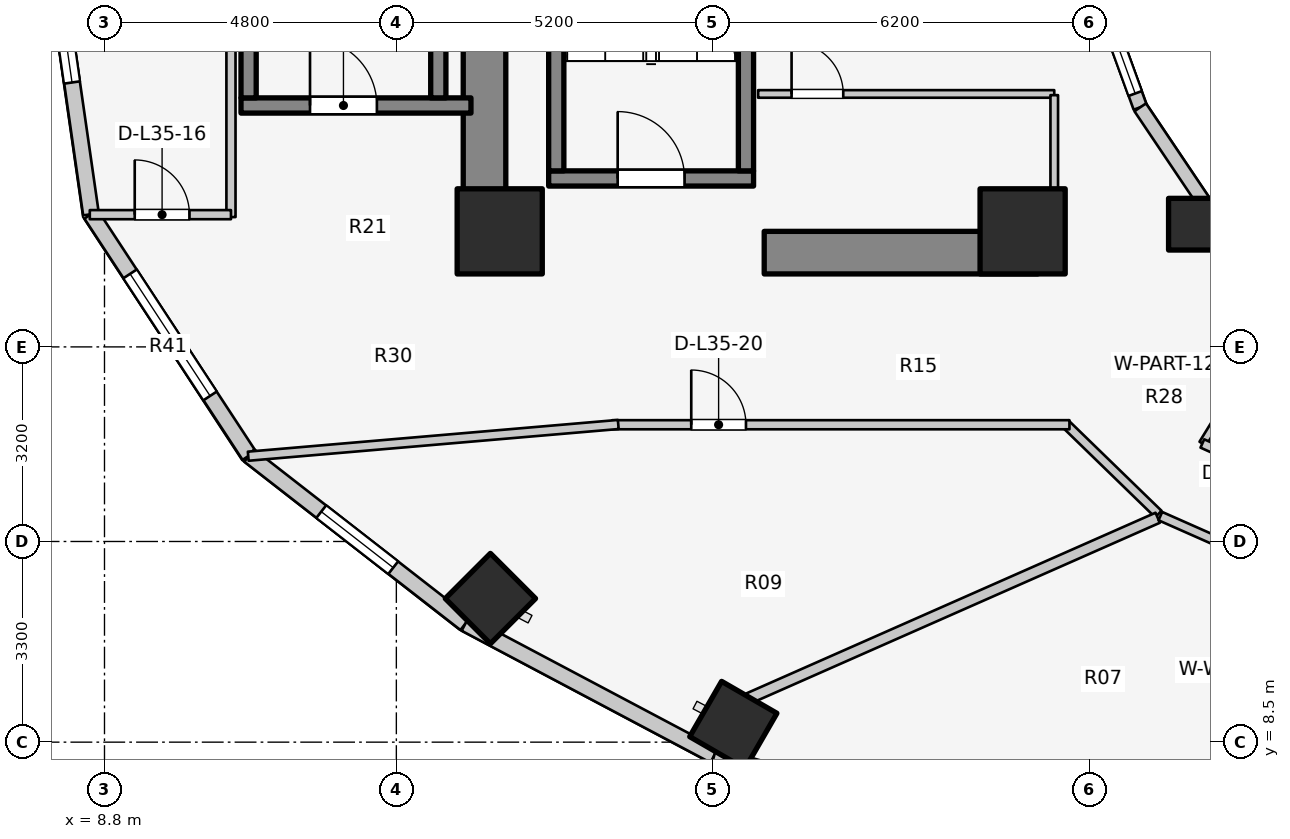
"""IFC4 building model, lengths in metres.
Left out: names, types, materials, properties, quantities, classifications, styles, units other than length and angle.
Written with IfcOpenShell. Run it as: python <this file> out.ifc"""

import sys

from ifc_helpers import new_model, si_unit, direction, frame, frame_2d, origin, origin_2d, place, context, subcontext, project, spatial, rectangle, extrude, element, fill, save


model = new_model("IFC4")
c1 = context("Model", 3, precision=1e-05, world=origin(), true_north=direction((0.0, 1.0)))
c2 = subcontext(c1, "Body", "Model", "MODEL_VIEW")
j1 = project(units=[si_unit("LENGTHUNIT", "METRE"), si_unit("PLANEANGLEUNIT", "RADIAN")], contexts=[c1])
p1 = place(None, origin())
s1 = spatial("IfcSite", under=j1, at=p1, CompositionType="ELEMENT")
p2 = place(p1, origin())
s2 = spatial("IfcBuilding", under=s1, at=p2, CompositionType="ELEMENT")
p3 = place(p2, frame((0.0, 0.0, 116.6)))
s3 = spatial("IfcBuildingStorey", under=s2, at=p3, CompositionType="ELEMENT", Elevation=116.6)
p4 = place(p3, frame((15.05, 17.05, 0.0), z_axis=(0.0, 0.0, 1.0), x_axis=(0.0, 1.0, 0.0)))
e1 = element("IfcWall", 1, at=p4, inside=s3, PredefinedType="SHEAR", context=c2, shape_type="SweptSolid", body=[
    extrude(rectangle(XDim=12.8, YDim=0.7, at=frame_2d((6.4, 0.0))), origin(), (0.0, 0.0, 1.0), 3.1),
])
p5 = place(p3, frame((19.65, 16.55, 0.0), z_axis=(0.0, 0.0, 1.0), x_axis=(1.0, 0.0, 0.0)))
e2 = element("IfcWall", 2, at=p5, inside=s3, PredefinedType="SHEAR", context=c2, shape_type="SweptSolid", body=[
    extrude(rectangle(XDim=4.5, YDim=0.7, at=frame_2d((2.25, 0.0))), origin(), (0.0, 0.0, 1.0), 3.1),
])
p6 = place(p3, frame((16.105, 17.77, 0.0), z_axis=(0.0, 0.0, 1.0), x_axis=(1.0, 0.0, 0.0)))
e3 = element("IfcWall", 3, at=p6, inside=s3, PredefinedType="SOLIDWALL", context=c2, shape_type="SweptSolid", body=[
    extrude(rectangle(XDim=3.37, YDim=0.25, at=frame_2d((1.685, 0.0))), origin(), (0.0, 0.0, 1.0), 3.1),
])
p7 = place(p6, frame((1.135, 0.0, 0.0)))
e4 = element("IfcOpeningElement", 4, at=p7, cuts=e3, PredefinedType="OPENING", context=c2, shape_type="SweptSolid", body=[
    extrude(rectangle(XDim=1.1, YDim=2.1, at=frame_2d((0.55, 1.05))), frame((0.0, 0.135, 0.0), z_axis=(0.0, -1.0, 0.0), x_axis=(1.0, 0.0, 0.0)), (0.0, 0.0, 1.0), 0.27),
])
for number, where, z_axis, x_axis in (
    (5, (16.23, 17.895, 0.0), (0.0, 0.0, 1.0), (0.0, 1.0, 0.0)),
    (6, (19.35, 17.895, 0.0), (0.0, 0.0, 1.0), (0.0, 1.0, 0.0)),
):
    element("IfcWall", number, at=place(p3, frame(where, z_axis=z_axis, x_axis=x_axis)), inside=s3, PredefinedType="SOLIDWALL", context=c2, shape_type="SweptSolid", body=[
        extrude(rectangle(XDim=7.81, YDim=0.25, at=frame_2d((3.905, 0.0))), origin(), (0.0, 0.0, 1.0), 3.1),
    ])
p8 = place(p3, frame((11.045, 18.97, 0.0), z_axis=(0.0, 0.0, 1.0), x_axis=(1.0, 0.0, 0.0)))
e7 = element("IfcWall", 7, at=p8, inside=s3, PredefinedType="SOLIDWALL", context=c2, shape_type="SweptSolid", body=[
    extrude(rectangle(XDim=3.782, YDim=0.25, at=frame_2d((1.891, 0.0))), origin(), (0.0, 0.0, 1.0), 3.1),
])
p9 = place(p8, frame((1.135, 0.0, 0.0)))
e8 = element("IfcOpeningElement", 8, at=p9, cuts=e7, PredefinedType="OPENING", context=c2, shape_type="SweptSolid", body=[
    extrude(rectangle(XDim=1.1, YDim=2.1, at=frame_2d((0.55, 1.05))), frame((0.0, 0.135, 0.0), z_axis=(0.0, -1.0, 0.0), x_axis=(1.0, 0.0, 0.0)), (0.0, 0.0, 1.0), 0.27),
])
for number, where, z_axis, x_axis in (
    (9, (11.17, 19.095, 0.0), (0.0, 0.0, 1.0), (0.0, 1.0, 0.0)),
    (10, (14.29, 19.095, 0.0), (0.0, 0.0, 1.0), (0.0, 1.0, 0.0)),
):
    element("IfcWall", number, at=place(p3, frame(where, z_axis=z_axis, x_axis=x_axis)), inside=s3, PredefinedType="SOLIDWALL", context=c2, shape_type="SweptSolid", body=[
        extrude(rectangle(XDim=7.81, YDim=0.25, at=frame_2d((3.905, 0.0))), origin(), (0.0, 0.0, 1.0), 3.1),
    ])
for number, where, z_axis, x_axis in (
    (11, (15.3, 16.9, 0.0), (0.0, 0.0, 1.0), (1.0, 0.0, 0.0)),
    (12, (23.9, 16.9, 0.0), (0.0, 0.0, 1.0), (1.0, 0.0, 0.0)),
):
    element("IfcColumn", number, at=place(p3, frame(where, z_axis=z_axis, x_axis=x_axis)), inside=s3, PredefinedType="COLUMN", context=c2, shape_type="SweptSolid", body=[
        extrude(rectangle(XDim=1.4, YDim=1.4, at=origin_2d()), origin(), (0.0, 0.0, 1.0), 3.1),
    ])
p10 = place(p3, frame((26.725, 17.018, 0.0), z_axis=(0.0, 0.0, 1.0), x_axis=(1.0, 0.0, 0.0)))
e13 = element("IfcColumn", 13, at=p10, inside=s3, PredefinedType="COLUMN", context=c2, shape_type="SweptSolid", body=[
    extrude(rectangle(XDim=0.85, YDim=0.85, at=origin_2d()), origin(), (0.0, 0.0, 1.0), 3.1),
])
for number, where, z_axis, x_axis in (
    (14, (15.147, 10.862, 0.0), (0.0, 0.0, 1.0), (-0.707, -0.707, 0.0)),
    (15, (19.142, 8.782, 0.0), (0.0, 0.0, 1.0), (-0.5, -0.866, 0.0)),
):
    element("IfcColumn", number, at=place(p3, frame(where, z_axis=z_axis, x_axis=x_axis)), inside=s3, PredefinedType="COLUMN", context=c2, shape_type="SweptSolid", body=[
        extrude(rectangle(XDim=1.05, YDim=1.05, at=origin_2d()), origin(), (0.0, 0.0, 1.0), 3.1),
    ])
p11 = place(p3, frame((25.123, 20.898, 0.0), z_axis=(0.0, 0.0, 1.0), x_axis=(0.341423187295, -0.93990968033, 0.0)))
e16 = element("IfcWall", 16, at=p11, inside=s3, PredefinedType="STANDARD", context=c2, shape_type="SweptSolid", body=[
    extrude(rectangle(XDim=2.084, YDim=0.23, at=frame_2d((1.042, 0.0))), origin(), (0.0, 0.0, 1.0), 2.84),
])
p12 = place(p11, frame((0.242, 0.0, 0.85)))
e17 = element("IfcOpeningElement", 17, at=p12, cuts=e16, PredefinedType="OPENING", context=c2, shape_type="SweptSolid", body=[
    extrude(rectangle(XDim=1.6, YDim=1.65, at=frame_2d((0.8, 0.825))), frame((0.0, 0.125, 0.0), z_axis=(0.0, -1.0, 0.0), x_axis=(1.0, 0.0, 0.0)), (0.0, 0.0, 1.0), 0.25),
])
p13 = place(p3, frame((25.834, 18.94, 0.0), z_axis=(0.0, 0.0, 1.0), x_axis=(0.558197800898, -0.829707909492, 0.0)))
e18 = element("IfcWall", 18, at=p13, inside=s3, PredefinedType="STANDARD", context=c2, shape_type="SweptSolid", body=[
    extrude(rectangle(XDim=2.027, YDim=0.23, at=frame_2d((1.013, 0.0))), origin(), (0.0, 0.0, 1.0), 2.16),
])
p14 = place(p3, frame((26.965, 17.258, 0.0), z_axis=(0.0, 0.0, 1.0), x_axis=(0.752576694707, -0.658504607869, 0.0)))
e19 = element("IfcWall", 19, at=p14, inside=s3, PredefinedType="STANDARD", context=c2, shape_type="SweptSolid", body=[
    extrude(rectangle(XDim=1.959, YDim=0.23, at=frame_2d((0.98, 0.0))), origin(), (0.0, 0.0, 1.0), 2.16),
])
p15 = place(p3, frame((7.74, 23.0, 0.0), z_axis=(0.0, 0.0, 1.0), x_axis=(0.142572472068, -0.98978436551, 0.0)))
e20 = element("IfcWall", 20, at=p15, inside=s3, PredefinedType="STANDARD", context=c2, shape_type="SweptSolid", body=[
    extrude(rectangle(XDim=5.879, YDim=0.26, at=frame_2d((2.939, 0.0))), origin(), (0.0, 0.0, 1.0), 2.85),
])
p16 = place(p15, frame((2.189, 0.0, 0.75)))
e21 = element("IfcOpeningElement", 21, at=p16, cuts=e20, PredefinedType="OPENING", context=c2, shape_type="SweptSolid", body=[
    extrude(rectangle(XDim=1.5, YDim=1.6, at=frame_2d((0.75, 0.8))), frame((0.0, 0.14, 0.0), z_axis=(0.0, -1.0, 0.0), x_axis=(1.0, 0.0, 0.0)), (0.0, 0.0, 1.0), 0.28),
])
p17 = place(p3, frame((8.578, 17.181, 0.0), z_axis=(0.0, 0.0, 1.0), x_axis=(0.548283220945, -0.836292717672, 0.0)))
e22 = element("IfcWall", 22, at=p17, inside=s3, PredefinedType="STANDARD", context=c2, shape_type="SweptSolid", body=[
    extrude(rectangle(XDim=4.744, YDim=0.26, at=frame_2d((2.372, 0.0))), origin(), (0.0, 0.0, 1.0), 2.85),
])
p18 = place(p17, frame((1.172, 0.0, 0.75)))
e23 = element("IfcOpeningElement", 23, at=p18, cuts=e22, PredefinedType="OPENING", context=c2, shape_type="SweptSolid", body=[
    extrude(rectangle(XDim=2.4, YDim=1.7, at=frame_2d((1.2, 0.85))), frame((0.0, 0.14, 0.0), z_axis=(0.0, -1.0, 0.0), x_axis=(1.0, 0.0, 0.0)), (0.0, 0.0, 1.0), 0.28),
])
p19 = place(p3, frame((11.179, 13.214, 0.0), z_axis=(0.0, 0.0, 1.0), x_axis=(0.789127449954, -0.614229491094, 0.0)))
e24 = element("IfcWall", 24, at=p19, inside=s3, PredefinedType="STANDARD", context=c2, shape_type="SweptSolid", body=[
    extrude(rectangle(XDim=4.505, YDim=0.26, at=frame_2d((2.252, 0.0))), origin(), (0.0, 0.0, 1.0), 2.85),
])
p20 = place(p19, frame((1.502, 0.0, 0.75)))
e25 = element("IfcOpeningElement", 25, at=p20, cuts=e24, PredefinedType="OPENING", context=c2, shape_type="SweptSolid", body=[
    extrude(rectangle(XDim=1.5, YDim=1.6, at=frame_2d((0.75, 0.8))), frame((0.0, 0.14, 0.0), z_axis=(0.0, -1.0, 0.0), x_axis=(1.0, 0.0, 0.0)), (0.0, 0.0, 1.0), 0.28),
])
p21 = place(p3, frame((14.734, 10.447, 0.0), z_axis=(0.0, 0.0, 1.0), x_axis=(0.883668636807, -0.4681129568, 0.0)))
e26 = element("IfcWall", 26, at=p21, inside=s3, PredefinedType="STANDARD", context=c2, shape_type="SweptSolid", body=[
    extrude(rectangle(XDim=4.631, YDim=0.26, at=frame_2d((2.316, 0.0))), origin(), (0.0, 0.0, 1.0), 2.85),
])
p22 = place(p3, frame((18.827, 8.279, 0.0), z_axis=(0.0, 0.0, 1.0), x_axis=(0.962938491413, -0.269721081407, 0.0)))
e27 = element("IfcWall", 27, at=p22, inside=s3, PredefinedType="STANDARD", context=c2, shape_type="SweptSolid", body=[
    extrude(rectangle(XDim=5.563, YDim=0.26, at=frame_2d((2.782, 0.0))), origin(), (0.0, 0.0, 1.0), 2.85),
])
p23 = place(p22, frame((1.582, 0.0, 0.75)))
e28 = element("IfcOpeningElement", 28, at=p23, cuts=e27, PredefinedType="OPENING", context=c2, shape_type="SweptSolid", body=[
    extrude(rectangle(XDim=2.4, YDim=1.7, at=frame_2d((1.2, 0.85))), frame((0.0, 0.14, 0.0), z_axis=(0.0, -1.0, 0.0), x_axis=(1.0, 0.0, 0.0)), (0.0, 0.0, 1.0), 0.28),
])
p24 = place(p3, frame((19.55, 19.16, 0.0), z_axis=(0.0, 0.0, 1.0), x_axis=(1.0, 0.0, 0.0)))
e29 = element("IfcWall", 29, at=p24, inside=s3, PredefinedType="PARTITIONING", context=c2, shape_type="SweptSolid", body=[
    extrude(rectangle(XDim=4.87, YDim=0.125, at=frame_2d((2.435, 0.0))), origin(), (0.0, 0.0, 1.0), 2.12),
])
p25 = place(p24, frame((0.55, 0.0, 0.0)))
e30 = element("IfcOpeningElement", 30, at=p25, cuts=e29, PredefinedType="OPENING", context=c2, shape_type="SweptSolid", body=[
    extrude(rectangle(XDim=0.85, YDim=2.05, at=frame_2d((0.425, 1.025))), frame((0.0, 0.073, 0.0), z_axis=(0.0, -1.0, 0.0), x_axis=(1.0, 0.0, 0.0)), (0.0, 0.0, 1.0), 0.145),
])
p26 = place(p3, frame((24.42, 17.1, 0.0), z_axis=(0.0, 0.0, 1.0), x_axis=(0.0, 1.0, 0.0)))
e31 = element("IfcWall", 31, at=p26, inside=s3, PredefinedType="PARTITIONING", context=c2, shape_type="SweptSolid", body=[
    extrude(rectangle(XDim=2.04, YDim=0.125, at=frame_2d((1.02, 0.0))), origin(), (0.0, 0.0, 1.0), 2.153),
])
p27 = place(p3, frame((10.88, 17.135, 0.0), z_axis=(0.0, 0.0, 1.0), x_axis=(0.0, 1.0, 0.0)))
e32 = element("IfcWall", 32, at=p27, inside=s3, PredefinedType="PARTITIONING", context=c2, shape_type="SweptSolid", body=[
    extrude(rectangle(XDim=11.73, YDim=0.15, at=frame_2d((5.865, 0.0))), origin(), (0.0, 0.0, 1.0), 2.12),
])
p28 = place(p3, frame((8.558, 17.175, 0.0), z_axis=(0.0, 0.0, 1.0), x_axis=(1.0, 0.0, 0.0)))
e33 = element("IfcWall", 33, at=p28, inside=s3, PredefinedType="PARTITIONING", context=c2, shape_type="SweptSolid", body=[
    extrude(rectangle(XDim=2.322, YDim=0.15, at=frame_2d((1.161, 0.0))), origin(), (0.0, 0.0, 1.0), 2.855),
])
p29 = place(p28, frame((0.739, 0.0, 0.0)))
e34 = element("IfcOpeningElement", 34, at=p29, cuts=e33, PredefinedType="OPENING", context=c2, shape_type="SweptSolid", body=[
    extrude(rectangle(XDim=0.9, YDim=2.1, at=frame_2d((0.45, 1.05))), frame((0.0, 0.085, 0.0), z_axis=(0.0, -1.0, 0.0), x_axis=(1.0, 0.0, 0.0)), (0.0, 0.0, 1.0), 0.17),
])
p30 = place(p3, frame((26.133, 12.251, 0.0), z_axis=(0.0, 0.0, 1.0), x_axis=(-0.717419568599, 0.696641344302, 0.0)))
e35 = element("IfcWall", 35, at=p30, inside=s3, PredefinedType="PARTITIONING", context=c2, shape_type="SweptSolid", body=[
    extrude(rectangle(XDim=2.138, YDim=0.15, at=frame_2d((1.069, 0.0))), origin(), (0.0, 0.0, 1.0), 2.272),
])
p31 = place(p3, frame((17.15, 13.72, 0.0), z_axis=(0.0, 0.0, 1.0), x_axis=(1.0, 0.0, 0.0)))
e36 = element("IfcWall", 36, at=p31, inside=s3, PredefinedType="PARTITIONING", context=c2, shape_type="SweptSolid", body=[
    extrude(rectangle(XDim=7.52, YDim=0.15, at=frame_2d((3.76, 0.0))), origin(), (0.0, 0.0, 1.0), 2.272),
])
p32 = place(p31, frame((1.3, 0.0, 0.0)))
e37 = element("IfcOpeningElement", 37, at=p32, cuts=e36, PredefinedType="OPENING", context=c2, shape_type="SweptSolid", body=[
    extrude(rectangle(XDim=0.9, YDim=2.1, at=frame_2d((0.45, 1.05))), frame((0.0, 0.085, 0.0), z_axis=(0.0, -1.0, 0.0), x_axis=(1.0, 0.0, 0.0)), (0.0, 0.0, 1.0), 0.17),
])
p33 = place(p3, frame((17.25, 13.724, 0.0), z_axis=(0.0, 0.0, 1.0), x_axis=(-0.996341886029, -0.085456691633, 0.0)))
e38 = element("IfcWall", 38, at=p33, inside=s3, PredefinedType="PARTITIONING", context=c2, shape_type="SweptSolid", body=[
    extrude(rectangle(XDim=6.108, YDim=0.15, at=frame_2d((3.054, 0.0))), origin(), (0.0, 0.0, 1.0), 2.142),
])
p34 = place(p3, frame((28.45, 15.985, 0.0), z_axis=(0.0, 0.0, 1.0), x_axis=(-0.524565340045, -0.851370192116, 0.0)))
e39 = element("IfcWall", 39, at=p34, inside=s3, PredefinedType="PARTITIONING", context=c2, shape_type="SweptSolid", body=[
    extrude(rectangle(XDim=3.027, YDim=0.125, at=frame_2d((1.514, 0.0))), origin(), (0.0, 0.0, 1.0), 2.272),
])
p35 = place(p3, frame((26.856, 13.412, 0.0), z_axis=(0.0, 0.0, 1.0), x_axis=(0.912985265053, -0.407992531545, 0.0)))
e40 = element("IfcWall", 40, at=p35, inside=s3, PredefinedType="PARTITIONING", context=c2, shape_type="SweptSolid", body=[
    extrude(rectangle(XDim=2.723, YDim=0.15, at=frame_2d((1.362, 0.0))), origin(), (0.0, 0.0, 1.0), 2.272),
])
p36 = place(p3, frame((26.122, 12.191, 0.0), z_axis=(0.0, 0.0, 1.0), x_axis=(-0.914765930761, -0.403984271872, 0.0)))
e41 = element("IfcWall", 41, at=p36, inside=s3, PredefinedType="PARTITIONING", context=c2, shape_type="SweptSolid", body=[
    extrude(rectangle(XDim=7.354, YDim=0.18, at=frame_2d((3.677, 0.0))), origin(), (0.0, 0.0, 1.0), 2.272),
])
p37 = place(p3, frame((26.165, 12.217, 0.0), z_axis=(0.0, 0.0, 1.0), x_axis=(0.91445214467, -0.404694051239, 0.0)))
e42 = element("IfcWall", 42, at=p37, inside=s3, PredefinedType="PARTITIONING", context=c2, shape_type="SweptSolid", body=[
    extrude(rectangle(XDim=3.091, YDim=0.15, at=frame_2d((1.545, 0.0))), origin(), (0.0, 0.0, 1.0), 2.272),
])
p38 = place(p37, frame((1.045, 0.0, 0.0)))
e43 = element("IfcOpeningElement", 43, at=p38, cuts=e42, PredefinedType="OPENING", context=c2, shape_type="SweptSolid", body=[
    extrude(rectangle(XDim=1.0, YDim=2.1, at=frame_2d((0.5, 1.05))), frame((0.0, 0.085, 0.0), z_axis=(0.0, -1.0, 0.0), x_axis=(1.0, 0.0, 0.0)), (0.0, 0.0, 1.0), 0.17),
])
p39 = place(p12, origin())
e44 = element("IfcWindow", 44, at=p39, inside=s3, PartitioningType="SINGLE_PANEL", PredefinedType="WINDOW", context=c2, shape_type="SweptSolid", body=[
    extrude(rectangle(XDim=1.6, YDim=1.65, at=frame_2d((0.8, 0.825))), frame((0.0, 0.03, 0.0), z_axis=(0.0, -1.0, 0.0), x_axis=(1.0, 0.0, 0.0)), (0.0, 0.0, 1.0), 0.06),
])
fill(e17, e44)
p40 = place(p16, origin())
e45 = element("IfcWindow", 45, at=p40, inside=s3, PartitioningType="SINGLE_PANEL", PredefinedType="WINDOW", context=c2, shape_type="SweptSolid", body=[
    extrude(rectangle(XDim=1.5, YDim=1.6, at=frame_2d((0.75, 0.8))), frame((0.0, 0.03, 0.0), z_axis=(0.0, -1.0, 0.0), x_axis=(1.0, 0.0, 0.0)), (0.0, 0.0, 1.0), 0.06),
])
fill(e21, e45)
p41 = place(p18, origin())
e46 = element("IfcWindow", 46, at=p41, inside=s3, PartitioningType="SINGLE_PANEL", PredefinedType="WINDOW", context=c2, shape_type="SweptSolid", body=[
    extrude(rectangle(XDim=2.4, YDim=1.7, at=frame_2d((1.2, 0.85))), frame((0.0, 0.03, 0.0), z_axis=(0.0, -1.0, 0.0), x_axis=(1.0, 0.0, 0.0)), (0.0, 0.0, 1.0), 0.06),
])
fill(e23, e46)
p42 = place(p20, origin())
e47 = element("IfcWindow", 47, at=p42, inside=s3, PartitioningType="SINGLE_PANEL", PredefinedType="WINDOW", context=c2, shape_type="SweptSolid", body=[
    extrude(rectangle(XDim=1.5, YDim=1.6, at=frame_2d((0.75, 0.8))), frame((0.0, 0.03, 0.0), z_axis=(0.0, -1.0, 0.0), x_axis=(1.0, 0.0, 0.0)), (0.0, 0.0, 1.0), 0.06),
])
fill(e25, e47)
p43 = place(p7, origin())
e48 = element("IfcDoor", 48, at=p43, inside=s3, OperationType="SINGLE_SWING_LEFT", PredefinedType="DOOR", context=c2, shape_type="SweptSolid", body=[
    extrude(rectangle(XDim=1.1, YDim=2.1, at=frame_2d((0.55, 1.05))), frame((0.0, 0.025, 0.0), z_axis=(0.0, -1.0, 0.0), x_axis=(1.0, 0.0, 0.0)), (0.0, 0.0, 1.0), 0.05),
])
fill(e4, e48)
p44 = place(p9, origin())
e49 = element("IfcDoor", 49, at=p44, inside=s3, OperationType="SINGLE_SWING_LEFT", PredefinedType="DOOR", context=c2, shape_type="SweptSolid", body=[
    extrude(rectangle(XDim=1.1, YDim=2.1, at=frame_2d((0.55, 1.05))), frame((0.0, 0.025, 0.0), z_axis=(0.0, -1.0, 0.0), x_axis=(1.0, 0.0, 0.0)), (0.0, 0.0, 1.0), 0.05),
])
fill(e8, e49)
p45 = place(p25, origin())
e50 = element("IfcDoor", 50, at=p45, inside=s3, OperationType="SINGLE_SWING_LEFT", PredefinedType="DOOR", context=c2, shape_type="SweptSolid", body=[
    extrude(rectangle(XDim=0.85, YDim=2.05, at=frame_2d((0.425, 1.025))), frame((0.0, 0.025, 0.0), z_axis=(0.0, -1.0, 0.0), x_axis=(1.0, 0.0, 0.0)), (0.0, 0.0, 1.0), 0.05),
])
fill(e30, e50)
p46 = place(p29, origin())
e51 = element("IfcDoor", 51, at=p46, inside=s3, OperationType="SINGLE_SWING_LEFT", PredefinedType="DOOR", context=c2, shape_type="SweptSolid", body=[
    extrude(rectangle(XDim=0.9, YDim=2.1, at=frame_2d((0.45, 1.05))), frame((0.0, 0.025, 0.0), z_axis=(0.0, -1.0, 0.0), x_axis=(1.0, 0.0, 0.0)), (0.0, 0.0, 1.0), 0.05),
])
fill(e34, e51)
p47 = place(p32, origin())
e52 = element("IfcDoor", 52, at=p47, inside=s3, OperationType="SINGLE_SWING_LEFT", PredefinedType="DOOR", context=c2, shape_type="SweptSolid", body=[
    extrude(rectangle(XDim=0.9, YDim=2.1, at=frame_2d((0.45, 1.05))), frame((0.0, 0.025, 0.0), z_axis=(0.0, -1.0, 0.0), x_axis=(1.0, 0.0, 0.0)), (0.0, 0.0, 1.0), 0.05),
])
fill(e37, e52)
save(model, sys.argv[1])
